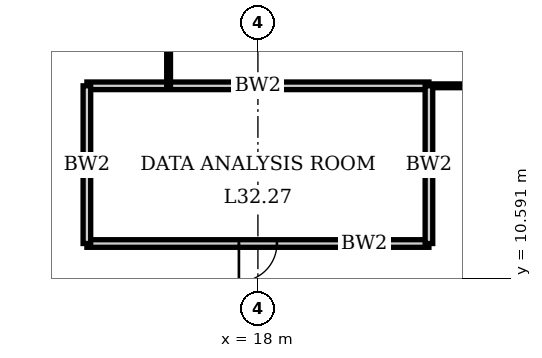
"""IFC4 building model, lengths in metres.
Left out: names, types, materials, properties, quantities, classifications, styles, units other than length and angle.
Written with IfcOpenShell. Run it as: python <this file> out.ifc"""

import sys

from ifc_helpers import new_model, si_unit, direction, frame, frame_2d, origin, place, context, subcontext, project, spatial, rectangle, extrude, element, fill, save


model = new_model("IFC4")
c1 = context("Model", 3, precision=1e-05, world=origin(), true_north=direction((0.0, 1.0)))
c2 = subcontext(c1, "Body", "Model", "MODEL_VIEW")
j1 = project(units=[si_unit("LENGTHUNIT", "METRE"), si_unit("PLANEANGLEUNIT", "RADIAN")], contexts=[c1])
p1 = place(None, origin())
s1 = spatial("IfcSite", under=j1, at=p1, CompositionType="ELEMENT")
p2 = place(p1, origin())
s2 = spatial("IfcBuilding", under=s1, at=p2, CompositionType="ELEMENT")
p3 = place(p2, frame((0.0, 0.0, 133.0)))
s3 = spatial("IfcBuildingStorey", under=s2, at=p3, CompositionType="ELEMENT", Elevation=133.0)
p4 = place(p3, frame((13.5, 11.5, 0.0), z_axis=(0.0, 0.0, 1.0), x_axis=(1.0, 0.0, 0.0)))
e1 = element("IfcWall", 1, at=p4, inside=s3, PredefinedType="SOLIDWALL", context=c2, shape_type="SweptSolid", body=[
    extrude(rectangle(XDim=9.0, YDim=0.2, at=frame_2d((4.5, 0.0))), origin(), (0.0, 0.0, 1.0), 3.75),
])
p5 = place(p4, frame((4.0, 0.0, 0.0)))
e2 = element("IfcOpeningElement", 2, at=p5, cuts=e1, PredefinedType="OPENING", context=c2, shape_type="SweptSolid", body=[
    extrude(rectangle(XDim=1.0, YDim=2.4, at=frame_2d((0.5, 1.2))), frame((0.0, 0.11, 0.0), z_axis=(0.0, -1.0, 0.0), x_axis=(1.0, 0.0, 0.0)), (0.0, 0.0, 1.0), 0.22),
])
p6 = place(p3, frame((13.5, 15.65, 0.0), z_axis=(0.0, 0.0, 1.0), x_axis=(1.0, 0.0, 0.0)))
e3 = element("IfcWall", 3, at=p6, inside=s3, PredefinedType="SOLIDWALL", context=c2, shape_type="SweptSolid", body=[
    extrude(rectangle(XDim=9.0, YDim=0.2, at=frame_2d((4.5, 0.0))), origin(), (0.0, 0.0, 1.0), 3.75),
])
p7 = place(p3, frame((22.5, 15.65, 0.0), z_axis=(0.0, 0.0, 1.0), x_axis=(1.0, 0.0, 0.0)))
e4 = element("IfcWall", 4, at=p7, inside=s3, PredefinedType="PARTITIONING", context=c2, shape_type="SweptSolid", body=[
    extrude(rectangle(XDim=13.5, YDim=0.1, at=frame_2d((6.75, 0.0))), origin(), (0.0, 0.0, 1.0), 3.75),
])
p8 = place(p7, frame((6.25, 0.0, 0.0)))
e5 = element("IfcOpeningElement", 5, at=p8, cuts=e4, PredefinedType="OPENING", context=c2, shape_type="SweptSolid", body=[
    extrude(rectangle(XDim=1.0, YDim=2.4, at=frame_2d((0.5, 1.2))), frame((0.0, 0.06, 0.0), z_axis=(0.0, -1.0, 0.0), x_axis=(1.0, 0.0, 0.0)), (0.0, 0.0, 1.0), 0.12),
])
p9 = place(p3, frame((13.5, 11.5, 0.0), z_axis=(0.0, 0.0, 1.0), x_axis=(0.0, 1.0, 0.0)))
e6 = element("IfcWall", 6, at=p9, inside=s3, PredefinedType="SOLIDWALL", context=c2, shape_type="SweptSolid", body=[
    extrude(rectangle(XDim=4.15, YDim=0.2, at=frame_2d((2.075, 0.0))), origin(), (0.0, 0.0, 1.0), 3.75),
])
p10 = place(p3, frame((15.65, 15.65, 0.0), z_axis=(0.0, 0.0, 1.0), x_axis=(0.0, 1.0, 0.0)))
e7 = element("IfcWall", 7, at=p10, inside=s3, PredefinedType="PARTITIONING", context=c2, shape_type="SweptSolid", body=[
    extrude(rectangle(XDim=20.9, YDim=0.1, at=frame_2d((10.45, 0.0))), origin(), (0.0, 0.0, 1.0), 3.75),
])
p11 = place(p10, frame((9.95, 0.0, 0.0)))
e8 = element("IfcOpeningElement", 8, at=p11, cuts=e7, PredefinedType="OPENING", context=c2, shape_type="SweptSolid", body=[
    extrude(rectangle(XDim=1.0, YDim=2.4, at=frame_2d((0.5, 1.2))), frame((0.0, 0.06, 0.0), z_axis=(0.0, -1.0, 0.0), x_axis=(1.0, 0.0, 0.0)), (0.0, 0.0, 1.0), 0.12),
])
p12 = place(p3, frame((22.5, 11.5, 0.0), z_axis=(0.0, 0.0, 1.0), x_axis=(0.0, 1.0, 0.0)))
e9 = element("IfcWall", 9, at=p12, inside=s3, PredefinedType="SOLIDWALL", context=c2, shape_type="SweptSolid", body=[
    extrude(rectangle(XDim=4.15, YDim=0.2, at=frame_2d((2.075, 0.0))), origin(), (0.0, 0.0, 1.0), 3.75),
])
p13 = place(p5, origin())
e10 = element("IfcDoor", 10, at=p13, inside=s3, OperationType="SINGLE_SWING_LEFT", PredefinedType="DOOR", context=c2, shape_type="SweptSolid", body=[
    extrude(rectangle(XDim=1.0, YDim=2.4, at=frame_2d((0.5, 1.2))), frame((0.0, 0.035, 0.0), z_axis=(0.0, -1.0, 0.0), x_axis=(1.0, 0.0, 0.0)), (0.0, 0.0, 1.0), 0.07),
])
fill(e2, e10)
save(model, sys.argv[1])
